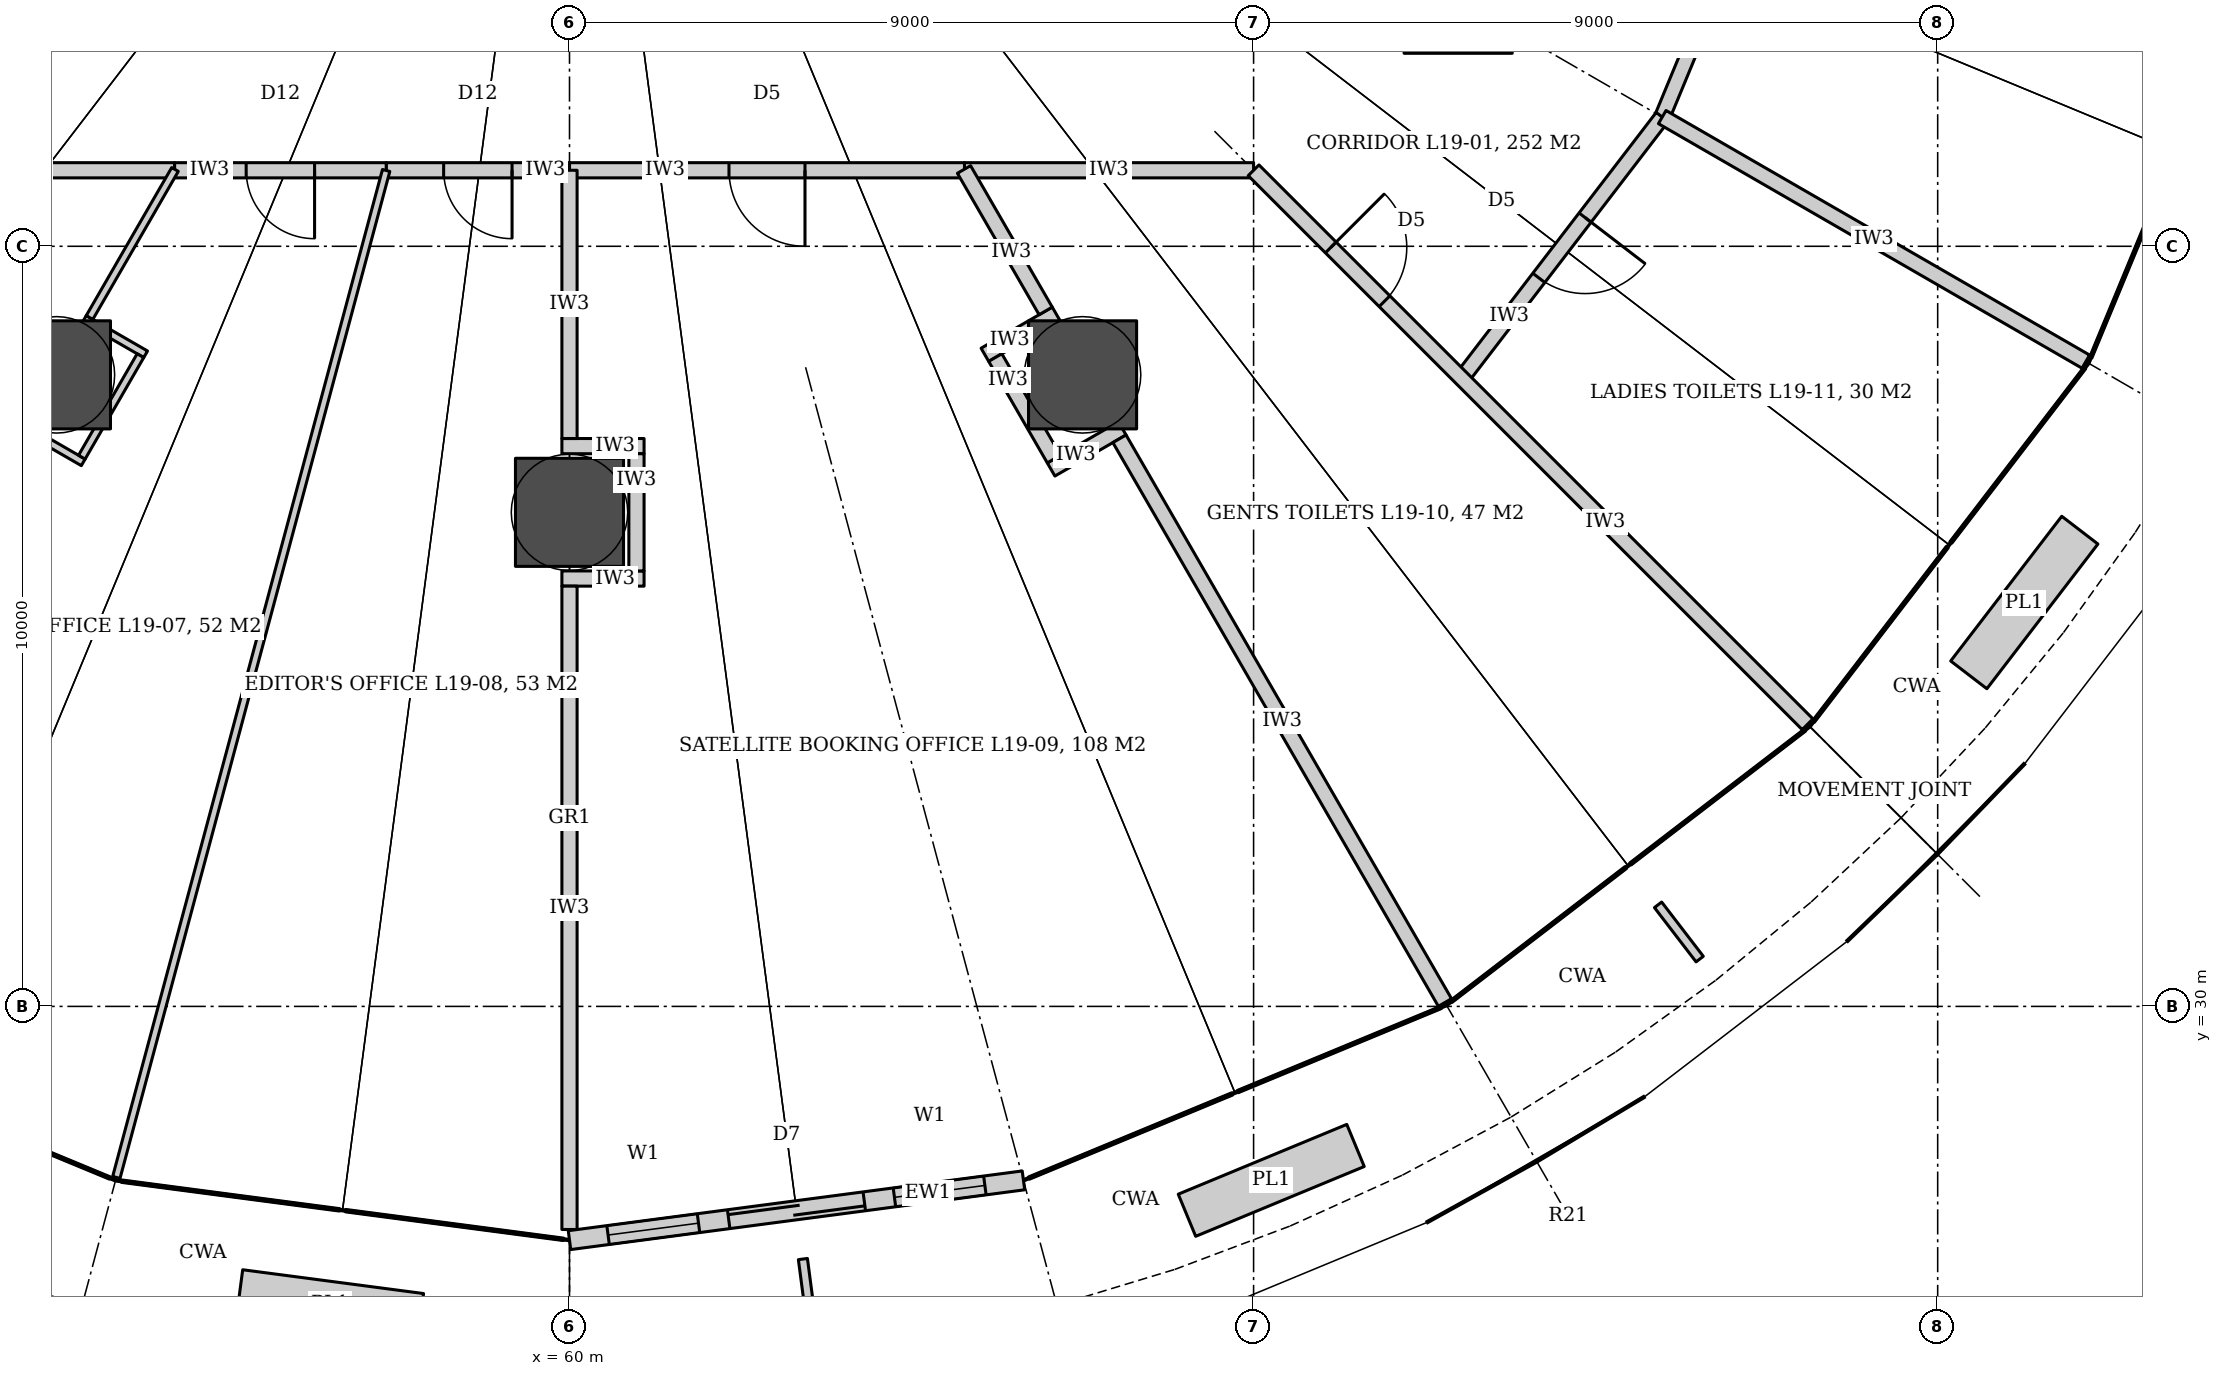
"""IFC4 building model, lengths in metres.
Left out: names, types, materials, properties, quantities, classifications, styles, units other than length and angle.
Written with IfcOpenShell. Run it as: python <this file> out.ifc"""

import sys

from ifc_helpers import new_model, si_unit, direction, frame, frame_2d, origin, origin_2d, place, context, subcontext, project, spatial, rectangle, hollow_circle, extrude, element, fill, save


model = new_model("IFC4")
c1 = context("Model", 3, precision=1e-05, world=origin(), true_north=direction((0.0, 1.0)))
c2 = subcontext(c1, "Body", "Model", "MODEL_VIEW")
j1 = project(units=[si_unit("LENGTHUNIT", "METRE"), si_unit("PLANEANGLEUNIT", "RADIAN")], contexts=[c1])
p1 = place(None, origin())
s1 = spatial("IfcSite", under=j1, at=p1, CompositionType="ELEMENT")
p2 = place(p1, origin())
s2 = spatial("IfcBuilding", under=s1, at=p2, CompositionType="ELEMENT")
p3 = place(p2, frame((0.0, 0.0, 80.6)))
s3 = spatial("IfcBuildingStorey", under=s2, at=p3, CompositionType="ELEMENT", Elevation=80.6)
for number, where, z_axis, x_axis in (
    (1, (53.25, 38.309, 0.0), (0.0, 0.0, 1.0), (1.0, 0.0, 0.0)),
    (2, (60.0, 36.5, 0.0), (0.0, 0.0, 1.0), (1.0, 0.0, 0.0)),
    (3, (66.75, 38.309, 0.0), (0.0, 0.0, 1.0), (1.0, 0.0, 0.0)),
    (4, (71.691, 43.25, 0.0), (0.0, 0.0, 1.0), (1.0, 0.0, 0.0)),
):
    element("IfcColumn", number, at=place(p3, frame(where, z_axis=z_axis, x_axis=x_axis)), inside=s3, PredefinedType="COLUMN", context=c2, shape_type="SweptSolid", body=[
        extrude(hollow_circle(Radius=0.711, WallThickness=0.07, at=origin_2d()), origin(), (0.0, 0.0, 1.0), 4.2),
    ])
p4 = place(p3, frame((76.034, 45.704, 0.0), z_axis=(0.0, 0.0, 1.0), x_axis=(-0.382698425325, -0.923873322082, 0.0)))
e5 = element("IfcWall", 5, at=p4, inside=s3, PredefinedType="PARTITIONING", context=c2, shape_type="SweptSolid", body=[
    extrude(rectangle(XDim=4.333, YDim=0.2, at=frame_2d((2.167, 0.0))), origin(), (0.0, 0.0, 1.0), 3.04),
])
p5 = place(p4, frame((1.667, 0.0, 0.0)))
e6 = element("IfcOpeningElement", 6, at=p5, cuts=e5, PredefinedType="OPENING", context=c2, shape_type="SweptSolid", body=[
    extrude(rectangle(XDim=1.0, YDim=2.1, at=frame_2d((0.5, 1.05))), frame((0.0, 0.11, 0.0), z_axis=(0.0, -1.0, 0.0), x_axis=(1.0, 0.0, 0.0)), (0.0, 0.0, 1.0), 0.22),
])
p6 = place(p3, frame((74.376, 41.7, 0.0), z_axis=(0.0, 0.0, 1.0), x_axis=(-0.60874374674, -0.79336690806, 0.0)))
e7 = element("IfcWall", 7, at=p6, inside=s3, PredefinedType="PARTITIONING", context=c2, shape_type="SweptSolid", body=[
    extrude(rectangle(XDim=4.333, YDim=0.2, at=frame_2d((2.167, 0.0))), origin(), (0.0, 0.0, 1.0), 3.04),
])
p7 = place(p6, frame((1.667, 0.0, 0.0)))
e8 = element("IfcOpeningElement", 8, at=p7, cuts=e7, PredefinedType="OPENING", context=c2, shape_type="SweptSolid", body=[
    extrude(rectangle(XDim=1.0, YDim=2.1, at=frame_2d((0.5, 1.05))), frame((0.0, 0.11, 0.0), z_axis=(0.0, -1.0, 0.0), x_axis=(1.0, 0.0, 0.0)), (0.0, 0.0, 1.0), 0.22),
])
p8 = place(p3, frame((69.0, 41.0, 0.0), z_axis=(0.0, 0.0, 1.0), x_axis=(-1.0, 0.0, 0.0)))
e9 = element("IfcWall", 9, at=p8, inside=s3, PredefinedType="PARTITIONING", context=c2, shape_type="SweptSolid", body=[
    extrude(rectangle(XDim=3.804, YDim=0.2, at=frame_2d((1.902, 0.0))), origin(), (0.0, 0.0, 1.0), 3.02),
])
p9 = place(p3, frame((65.196, 41.0, 0.0), z_axis=(0.0, 0.0, 1.0), x_axis=(-1.0, 0.0, 0.0)))
e10 = element("IfcWall", 10, at=p9, inside=s3, PredefinedType="PARTITIONING", context=c2, shape_type="SweptSolid", body=[
    extrude(rectangle(XDim=5.196, YDim=0.2, at=frame_2d((2.598, 0.0))), origin(), (0.0, 0.0, 1.0), 3.04),
])
p10 = place(p9, frame((2.098, 0.0, 0.0)))
e11 = element("IfcOpeningElement", 11, at=p10, cuts=e10, PredefinedType="OPENING", context=c2, shape_type="SweptSolid", body=[
    extrude(rectangle(XDim=1.0, YDim=2.1, at=frame_2d((0.5, 1.05))), frame((0.0, 0.11, 0.0), z_axis=(0.0, -1.0, 0.0), x_axis=(1.0, 0.0, 0.0)), (0.0, 0.0, 1.0), 0.22),
])
p11 = place(p3, frame((60.0, 41.0, 0.0), z_axis=(0.0, 0.0, 1.0), x_axis=(-1.0, 0.0, 0.0)))
e12 = element("IfcWall", 12, at=p11, inside=s3, PredefinedType="PARTITIONING", context=c2, shape_type="SweptSolid", body=[
    extrude(rectangle(XDim=2.412, YDim=0.2, at=frame_2d((1.206, 0.0))), origin(), (0.0, 0.0, 1.0), 3.04),
])
p12 = place(p11, frame((0.756, 0.0, 0.0)))
e13 = element("IfcOpeningElement", 13, at=p12, cuts=e12, PredefinedType="OPENING", context=c2, shape_type="SweptSolid", body=[
    extrude(rectangle(XDim=0.9, YDim=2.4, at=frame_2d((0.45, 1.2))), frame((0.0, 0.11, 0.0), z_axis=(0.0, -1.0, 0.0), x_axis=(1.0, 0.0, 0.0)), (0.0, 0.0, 1.0), 0.22),
])
p13 = place(p3, frame((57.588, 41.0, 0.0), z_axis=(0.0, 0.0, 1.0), x_axis=(-1.0, 0.0, 0.0)))
e14 = element("IfcWall", 14, at=p13, inside=s3, PredefinedType="PARTITIONING", context=c2, shape_type="SweptSolid", body=[
    extrude(rectangle(XDim=2.785, YDim=0.2, at=frame_2d((1.392, 0.0))), origin(), (0.0, 0.0, 1.0), 3.04),
])
p14 = place(p13, frame((0.942, 0.0, 0.0)))
e15 = element("IfcOpeningElement", 15, at=p14, cuts=e14, PredefinedType="OPENING", context=c2, shape_type="SweptSolid", body=[
    extrude(rectangle(XDim=0.9, YDim=2.4, at=frame_2d((0.45, 1.2))), frame((0.0, 0.11, 0.0), z_axis=(0.0, -1.0, 0.0), x_axis=(1.0, 0.0, 0.0)), (0.0, 0.0, 1.0), 0.22),
])
p15 = place(p3, frame((54.804, 41.0, 0.0), z_axis=(0.0, 0.0, 1.0), x_axis=(-1.0, 0.0, 0.0)))
e16 = element("IfcWall", 16, at=p15, inside=s3, PredefinedType="PARTITIONING", context=c2, shape_type="SweptSolid", body=[
    extrude(rectangle(XDim=3.804, YDim=0.2, at=frame_2d((1.902, 0.0))), origin(), (0.0, 0.0, 1.0), 3.02),
])
for number, where, z_axis, x_axis in (
    (17, (53.617, 39.045, 0.0), (0.0, 0.0, 1.0), (0.866, -0.5, 0.0)),
    (18, (52.796, 37.623, 0.0), (0.0, 0.0, 1.0), (0.866, -0.5, 0.0)),
):
    element("IfcWall", number, at=place(p3, frame(where, z_axis=z_axis, x_axis=x_axis)), inside=s3, PredefinedType="PARTITIONING", context=c2, shape_type="SweptSolid", body=[
        extrude(rectangle(XDim=0.931, YDim=0.1, at=frame_2d((0.466, 0.0))), origin(), (0.0, 0.0, 1.0), 3.02),
    ])
p16 = place(p3, frame((54.355, 38.561, 0.0), z_axis=(0.0, 0.0, 1.0), x_axis=(-0.50005597947, -0.86599308161, 0.0)))
e19 = element("IfcWall", 19, at=p16, inside=s3, PredefinedType="PARTITIONING", context=c2, shape_type="SweptSolid", body=[
    extrude(rectangle(XDim=1.542, YDim=0.1, at=frame_2d((0.771, 0.0))), origin(), (0.0, 0.0, 1.0), 3.02),
])
p17 = place(p3, frame((54.81, 41.011, 0.0), z_axis=(0.0, 0.0, 1.0), x_axis=(-0.499991822116, -0.866030125237, 0.0)))
e20 = element("IfcWall", 20, at=p17, inside=s3, PredefinedType="PARTITIONING", context=c2, shape_type="SweptSolid", body=[
    extrude(rectangle(XDim=2.249, YDim=0.1, at=frame_2d((1.125, 0.0))), origin(), (0.0, 0.0, 1.0), 3.04),
])
p18 = place(p3, frame((57.588, 40.998, 0.0), z_axis=(0.0, 0.0, 1.0), x_axis=(-0.258835854707, -0.965921322012, 0.0)))
e21 = element("IfcWall", 21, at=p18, inside=s3, PredefinedType="PARTITIONING", context=c2, shape_type="SweptSolid", body=[
    extrude(rectangle(XDim=13.74, YDim=0.1, at=frame_2d((6.87, 0.0))), origin(), (0.0, 0.0, 1.0), 3.02),
])
for number, where, z_axis, x_axis in (
    (22, (59.9, 37.371, 0.0), (0.0, 0.0, 1.0), (1.0, 0.0, 0.0)),
    (23, (59.9, 35.629, 0.0), (0.0, 0.0, 1.0), (1.0, 0.0, 0.0)),
):
    element("IfcWall", number, at=place(p3, frame(where, z_axis=z_axis, x_axis=x_axis)), inside=s3, PredefinedType="PARTITIONING", context=c2, shape_type="SweptSolid", body=[
        extrude(rectangle(XDim=1.081, YDim=0.2, at=frame_2d((0.541, 0.0))), origin(), (0.0, 0.0, 1.0), 3.02),
    ])
p19 = place(p3, frame((60.881, 37.271, 0.0), z_axis=(0.0, 0.0, 1.0), x_axis=(0.0, -1.0, 0.0)))
e24 = element("IfcWall", 24, at=p19, inside=s3, PredefinedType="PARTITIONING", context=c2, shape_type="SweptSolid", body=[
    extrude(rectangle(XDim=1.542, YDim=0.2, at=frame_2d((0.771, 0.0))), origin(), (0.0, 0.0, 1.0), 3.02),
])
p20 = place(p3, frame((60.0, 41.0, 0.0), z_axis=(0.0, 0.0, 1.0), x_axis=(0.0, -1.0, 0.0)))
e25 = element("IfcWall", 25, at=p20, inside=s3, PredefinedType="PARTITIONING", context=c2, shape_type="SweptSolid", body=[
    extrude(rectangle(XDim=3.529, YDim=0.2, at=frame_2d((1.765, 0.0))), origin(), (0.0, 0.0, 1.0), 3.04),
])
p21 = place(p3, frame((60.0, 35.529, 0.0), z_axis=(0.0, 0.0, 1.0), x_axis=(0.0, -1.0, 0.0)))
e26 = element("IfcWall", 26, at=p21, inside=s3, PredefinedType="PARTITIONING", context=c2, shape_type="SweptSolid", body=[
    extrude(rectangle(XDim=8.489, YDim=0.2, at=frame_2d((4.245, 0.0))), origin(), (0.0, 0.0, 1.0), 3.04),
])
for number, where, z_axis, x_axis in (
    (27, (66.401, 39.113, 0.0), (0.0, 0.0, 1.0), (-0.866, -0.5, 0.0)),
    (28, (67.272, 37.604, 0.0), (0.0, 0.0, 1.0), (-0.866, -0.5, 0.0)),
):
    element("IfcWall", number, at=place(p3, frame(where, z_axis=z_axis, x_axis=x_axis)), inside=s3, PredefinedType="PARTITIONING", context=c2, shape_type="SweptSolid", body=[
        extrude(rectangle(XDim=1.081, YDim=0.2, at=frame_2d((0.541, 0.0))), origin(), (0.0, 0.0, 1.0), 3.02),
    ])
p22 = place(p3, frame((65.602, 38.536, 0.0), z_axis=(0.0, 0.0, 1.0), x_axis=(0.499987416453, -0.866032668777, 0.0)))
e29 = element("IfcWall", 29, at=p22, inside=s3, PredefinedType="PARTITIONING", context=c2, shape_type="SweptSolid", body=[
    extrude(rectangle(XDim=1.542, YDim=0.2, at=frame_2d((0.771, 0.0))), origin(), (0.0, 0.0, 1.0), 3.02),
])
p23 = place(p3, frame((65.19, 41.011, 0.0), z_axis=(0.0, 0.0, 1.0), x_axis=(0.499987977232, -0.866032345022, 0.0)))
e30 = element("IfcWall", 30, at=p23, inside=s3, PredefinedType="PARTITIONING", context=c2, shape_type="SweptSolid", body=[
    extrude(rectangle(XDim=2.149, YDim=0.2, at=frame_2d((1.074, 0.0))), origin(), (0.0, 0.0, 1.0), 3.04),
])
p24 = place(p3, frame((67.236, 37.468, 0.0), z_axis=(0.0, 0.0, 1.0), x_axis=(0.499997214665, -0.866027011893, 0.0)))
e31 = element("IfcWall", 31, at=p24, inside=s3, PredefinedType="PARTITIONING", context=c2, shape_type="SweptSolid", body=[
    extrude(rectangle(XDim=8.589, YDim=0.2, at=frame_2d((4.294, 0.0))), origin(), (0.0, 0.0, 1.0), 3.04),
])
p25 = place(p3, frame((69.0, 41.0, 0.0), z_axis=(0.0, 0.0, 1.0), x_axis=(0.707106781187, -0.707106781187, 0.0)))
e32 = element("IfcWall", 32, at=p25, inside=s3, PredefinedType="PARTITIONING", context=c2, shape_type="SweptSolid", body=[
    extrude(rectangle(XDim=10.332, YDim=0.2, at=frame_2d((5.166, 0.0))), origin(), (0.0, 0.0, 1.0), 3.02),
])
p26 = place(p25, frame((1.436, 0.0, 0.0)))
e33 = element("IfcOpeningElement", 33, at=p26, cuts=e32, PredefinedType="OPENING", context=c2, shape_type="SweptSolid", body=[
    extrude(rectangle(XDim=1.0, YDim=2.1, at=frame_2d((0.5, 1.05))), frame((0.0, 0.11, 0.0), z_axis=(0.0, -1.0, 0.0), x_axis=(1.0, 0.0, 0.0)), (0.0, 0.0, 1.0), 0.22),
])
p27 = place(p3, frame((74.376, 41.7, 0.0), z_axis=(0.0, 0.0, 1.0), x_axis=(0.866025099701, -0.500000526688, 0.0)))
e34 = element("IfcWall", 34, at=p27, inside=s3, PredefinedType="PARTITIONING", context=c2, shape_type="SweptSolid", body=[
    extrude(rectangle(XDim=6.46, YDim=0.2, at=frame_2d((3.23, 0.0))), origin(), (0.0, 0.0, 1.0), 3.04),
])
p28 = place(p3, frame((60.0, 26.9, 0.0), z_axis=(0.0, 0.0, 1.0), x_axis=(0.991445060532, 0.130524679454, 0.0)))
e35 = element("IfcWall", 35, at=p28, inside=s3, PredefinedType="SOLIDWALL", context=c2, shape_type="SweptSolid", body=[
    extrude(rectangle(XDim=6.03, YDim=0.25, at=frame_2d((3.015, 0.0))), origin(), (0.0, 0.0, 1.0), 4.04),
])
p29 = place(p28, frame((2.115, 0.0, 0.0)))
e36 = element("IfcOpeningElement", 36, at=p29, cuts=e35, PredefinedType="OPENING", context=c2, shape_type="SweptSolid", body=[
    extrude(rectangle(XDim=1.8, YDim=2.4, at=frame_2d((0.9, 1.2))), frame((0.0, 0.135, 0.0), z_axis=(0.0, -1.0, 0.0), x_axis=(1.0, 0.0, 0.0)), (0.0, 0.0, 1.0), 0.27),
])
p30 = place(p28, frame((0.515, 0.0, 0.0)))
e37 = element("IfcOpeningElement", 37, at=p30, cuts=e35, PredefinedType="OPENING", context=c2, shape_type="SweptSolid", body=[
    extrude(rectangle(XDim=1.2, YDim=2.4, at=frame_2d((0.6, 1.2))), frame((0.0, 0.135, 0.0), z_axis=(0.0, -1.0, 0.0), x_axis=(1.0, 0.0, 0.0)), (0.0, 0.0, 1.0), 0.27),
])
p31 = place(p28, frame((4.315, 0.0, 0.0)))
e38 = element("IfcOpeningElement", 38, at=p31, cuts=e35, PredefinedType="OPENING", context=c2, shape_type="SweptSolid", body=[
    extrude(rectangle(XDim=1.2, YDim=2.4, at=frame_2d((0.6, 1.2))), frame((0.0, 0.135, 0.0), z_axis=(0.0, -1.0, 0.0), x_axis=(1.0, 0.0, 0.0)), (0.0, 0.0, 1.0), 0.27),
])
p32 = place(p14, origin())
e39 = element("IfcDoor", 39, at=p32, inside=s3, OperationType="SINGLE_SWING_LEFT", PredefinedType="DOOR", context=c2, shape_type="SweptSolid", body=[
    extrude(rectangle(XDim=0.9, YDim=2.4, at=frame_2d((0.45, 1.2))), frame((0.0, 0.025, 0.0), z_axis=(0.0, -1.0, 0.0), x_axis=(1.0, 0.0, 0.0)), (0.0, 0.0, 1.0), 0.05),
])
fill(e15, e39)
p33 = place(p12, origin())
e40 = element("IfcDoor", 40, at=p33, inside=s3, OperationType="SINGLE_SWING_LEFT", PredefinedType="DOOR", context=c2, shape_type="SweptSolid", body=[
    extrude(rectangle(XDim=0.9, YDim=2.4, at=frame_2d((0.45, 1.2))), frame((0.0, 0.025, 0.0), z_axis=(0.0, -1.0, 0.0), x_axis=(1.0, 0.0, 0.0)), (0.0, 0.0, 1.0), 0.05),
])
fill(e13, e40)
p34 = place(p10, origin())
e41 = element("IfcDoor", 41, at=p34, inside=s3, OperationType="SINGLE_SWING_LEFT", PredefinedType="DOOR", context=c2, shape_type="SweptSolid", body=[
    extrude(rectangle(XDim=1.0, YDim=2.1, at=frame_2d((0.5, 1.05))), frame((0.0, 0.025, 0.0), z_axis=(0.0, -1.0, 0.0), x_axis=(1.0, 0.0, 0.0)), (0.0, 0.0, 1.0), 0.05),
])
fill(e11, e41)
p35 = place(p26, origin())
e42 = element("IfcDoor", 42, at=p35, inside=s3, OperationType="SINGLE_SWING_LEFT", PredefinedType="DOOR", context=c2, shape_type="SweptSolid", body=[
    extrude(rectangle(XDim=1.0, YDim=2.1, at=frame_2d((0.5, 1.05))), frame((0.0, 0.025, 0.0), z_axis=(0.0, -1.0, 0.0), x_axis=(1.0, 0.0, 0.0)), (0.0, 0.0, 1.0), 0.05),
])
fill(e33, e42)
p36 = place(p7, origin())
e43 = element("IfcDoor", 43, at=p36, inside=s3, OperationType="SINGLE_SWING_LEFT", PredefinedType="DOOR", context=c2, shape_type="SweptSolid", body=[
    extrude(rectangle(XDim=1.0, YDim=2.1, at=frame_2d((0.5, 1.05))), frame((0.0, 0.025, 0.0), z_axis=(0.0, -1.0, 0.0), x_axis=(1.0, 0.0, 0.0)), (0.0, 0.0, 1.0), 0.05),
])
fill(e8, e43)
p37 = place(p29, origin())
e44 = element("IfcDoor", 44, at=p37, inside=s3, OperationType="DOUBLE_DOOR_SLIDING", PredefinedType="DOOR", context=c2, shape_type="SweptSolid", body=[
    extrude(rectangle(XDim=1.8, YDim=2.4, at=frame_2d((0.9, 1.2))), frame((0.0, 0.025, 0.0), z_axis=(0.0, -1.0, 0.0), x_axis=(1.0, 0.0, 0.0)), (0.0, 0.0, 1.0), 0.05),
])
fill(e36, e44)
p38 = place(p30, origin())
e45 = element("IfcWindow", 45, at=p38, inside=s3, PartitioningType="SINGLE_PANEL", PredefinedType="WINDOW", context=c2, shape_type="SweptSolid", body=[
    extrude(rectangle(XDim=1.2, YDim=2.4, at=frame_2d((0.6, 1.2))), frame((0.0, 0.03, 0.0), z_axis=(0.0, -1.0, 0.0), x_axis=(1.0, 0.0, 0.0)), (0.0, 0.0, 1.0), 0.06),
])
fill(e37, e45)
p39 = place(p31, origin())
e46 = element("IfcWindow", 46, at=p39, inside=s3, PartitioningType="SINGLE_PANEL", PredefinedType="WINDOW", context=c2, shape_type="SweptSolid", body=[
    extrude(rectangle(XDim=1.2, YDim=2.4, at=frame_2d((0.6, 1.2))), frame((0.0, 0.03, 0.0), z_axis=(0.0, -1.0, 0.0), x_axis=(1.0, 0.0, 0.0)), (0.0, 0.0, 1.0), 0.06),
])
fill(e38, e46)
save(model, sys.argv[1])
